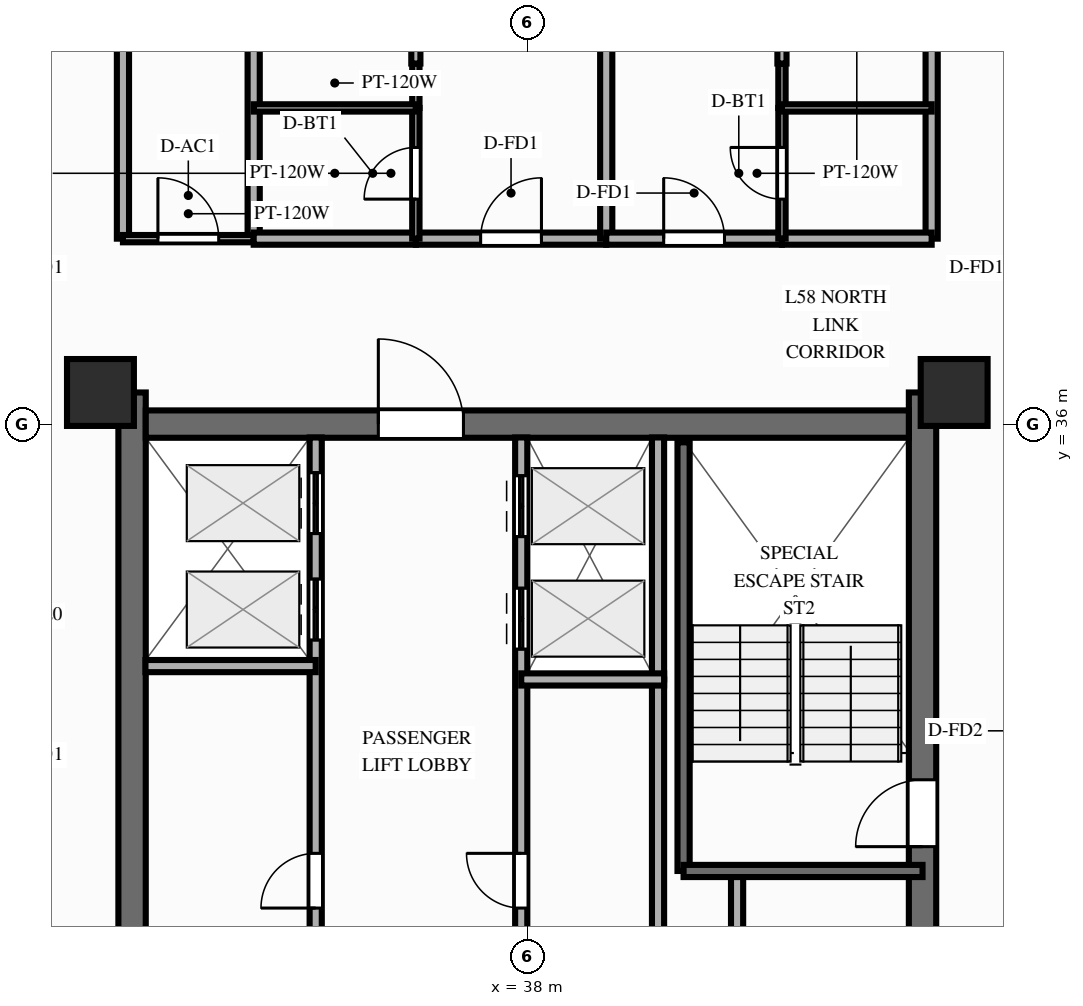
"""IFC4 building model, lengths in metres.
Left out: names, types, materials, properties, quantities, classifications, styles, units other than length and angle.
Written with IfcOpenShell. Run it as: python <this file> out.ifc"""

import sys

from ifc_helpers import new_model, si_unit, direction, frame, frame_2d, origin, origin_2d, place, context, subcontext, project, spatial, rectangle, extrude, source, transform, mapped, element, fill, save


model = new_model("IFC4")
c1 = context("Model", 3, precision=1e-05, world=origin(), true_north=direction((0.0, 1.0)))
c2 = subcontext(c1, "Body", "Model", "MODEL_VIEW")
j1 = project(units=[si_unit("LENGTHUNIT", "METRE"), si_unit("PLANEANGLEUNIT", "RADIAN")], contexts=[c1])
p1 = place(None, origin())
s1 = spatial("IfcSite", under=j1, at=p1, CompositionType="ELEMENT")
p2 = place(p1, origin())
s2 = spatial("IfcBuilding", under=s1, at=p2, CompositionType="ELEMENT")
p3 = place(p2, frame((0.0, 0.0, 186.7)))
s3 = spatial("IfcBuildingStorey", under=s2, at=p3, CompositionType="ELEMENT", Elevation=186.7)
p4 = place(p3, frame((31.5, 17.48, 0.0), z_axis=(0.0, 0.0, 1.0), x_axis=(0.0, 1.0, 0.0)))
e1 = element("IfcWall", 1, at=p4, inside=s3, PredefinedType="SHEAR", context=c2, shape_type="SweptSolid", body=[
    extrude(rectangle(XDim=19.04, YDim=0.45, at=frame_2d((9.52, 0.0))), origin(), (0.0, 0.0, 1.0), 3.0),
])
p5 = place(p4, frame((6.32, 0.0, 0.0)))
e2 = element("IfcOpeningElement", 2, at=p5, cuts=e1, PredefinedType="OPENING", context=c2, shape_type="SweptSolid", body=[
    extrude(rectangle(XDim=1.1, YDim=2.15, at=frame_2d((0.55, 1.075))), frame((0.0, 0.237, 0.0), z_axis=(0.0, -1.0, 0.0), x_axis=(1.0, 0.0, 0.0)), (0.0, 0.0, 1.0), 0.474),
])
p6 = place(p3, frame((44.5, 17.48, 0.0), z_axis=(0.0, 0.0, 1.0), x_axis=(0.0, 1.0, 0.0)))
e3 = element("IfcWall", 3, at=p6, inside=s3, PredefinedType="SHEAR", context=c2, shape_type="SweptSolid", body=[
    extrude(rectangle(XDim=19.04, YDim=0.45, at=frame_2d((9.52, 0.0))), origin(), (0.0, 0.0, 1.0), 3.0),
])
p7 = place(p6, frame((12.67, 0.0, 0.0), z_axis=(0.0, 0.0, 1.0), x_axis=(-1.0, 0.0, 0.0)))
e4 = element("IfcOpeningElement", 4, at=p7, cuts=e3, PredefinedType="OPENING", context=c2, shape_type="SweptSolid", body=[
    extrude(rectangle(XDim=1.1, YDim=2.15, at=frame_2d((0.55, 1.075))), frame((0.0, 0.237, 0.0), z_axis=(0.0, -1.0, 0.0), x_axis=(1.0, 0.0, 0.0)), (0.0, 0.0, 1.0), 0.474),
])
p8 = place(p3, frame((31.725, 36.0, 0.0), z_axis=(0.0, 0.0, 1.0), x_axis=(1.0, 0.0, 0.0)))
e5 = element("IfcWall", 5, at=p8, inside=s3, PredefinedType="SHEAR", context=c2, shape_type="SweptSolid", body=[
    extrude(rectangle(XDim=12.55, YDim=0.45, at=frame_2d((6.275, 0.0))), origin(), (0.0, 0.0, 1.0), 3.0),
])
p9 = place(p8, frame((5.225, 0.0, 0.0), z_axis=(0.0, 0.0, 1.0), x_axis=(-1.0, 0.0, 0.0)))
e6 = element("IfcOpeningElement", 6, at=p9, cuts=e5, PredefinedType="OPENING", context=c2, shape_type="SweptSolid", body=[
    extrude(rectangle(XDim=1.4, YDim=2.15, at=frame_2d((0.7, 1.075))), frame((0.0, 0.237, 0.0), z_axis=(0.0, -1.0, 0.0), x_axis=(1.0, 0.0, 0.0)), (0.0, 0.0, 1.0), 0.474),
])
m1 = source(origin(), c2, "Body", "SweptSolid", [
    extrude(rectangle(XDim=1.1, YDim=1.1, at=origin_2d()), origin(), (0.0, 0.0, 1.0), 3.0),
])
for number, where, z_axis, x_axis in (
    (7, (30.98, 36.52, 0.0), (0.0, 0.0, 1.0), (1.0, 0.0, 0.0)),
    (8, (45.02, 36.52, 0.0), (0.0, 0.0, 1.0), (1.0, 0.0, 0.0)),
):
    element("IfcColumn", number, at=place(p3, frame(where, z_axis=z_axis, x_axis=x_axis)), inside=s3, PredefinedType="COLUMN", context=c2, shape_type="MappedRepresentation", body=[
        mapped(m1, transform((0.0, 0.0, 0.0), scale=1.0)),
    ])
p10 = place(p3, frame((41.45, 21.18, 0.0), z_axis=(0.0, 0.0, 1.0), x_axis=(0.0, 1.0, 0.0)))
e9 = element("IfcWall", 9, at=p10, inside=s3, PredefinedType="PARTITIONING", context=c2, shape_type="SweptSolid", body=[
    extrude(rectangle(XDim=7.42, YDim=0.2, at=frame_2d((3.71, 0.0))), origin(), (0.0, 0.0, 1.0), 2.79),
])
p11 = place(p10, frame((2.6, 0.0, 0.0)))
e10 = element("IfcOpeningElement", 10, at=p11, cuts=e9, PredefinedType="OPENING", context=c2, shape_type="SweptSolid", body=[
    extrude(rectangle(XDim=0.9, YDim=2.1, at=frame_2d((0.45, 1.05))), frame((0.0, 0.112, 0.0), z_axis=(0.0, -1.0, 0.0), x_axis=(1.0, 0.0, 0.0)), (0.0, 0.0, 1.0), 0.224),
])
p12 = place(p3, frame((40.15, 25.44, 0.0), z_axis=(0.0, 0.0, 1.0), x_axis=(0.0, 1.0, 0.0)))
e11 = element("IfcWall", 11, at=p12, inside=s3, PredefinedType="PARTITIONING", context=c2, shape_type="SweptSolid", body=[
    extrude(rectangle(XDim=6.36, YDim=0.2, at=frame_2d((3.18, 0.0))), origin(), (0.0, 0.0, 1.0), 2.79),
])
p13 = place(p3, frame((40.15, 31.8, 0.0), z_axis=(0.0, 0.0, 1.0), x_axis=(0.0, 1.0, 0.0)))
e12 = element("IfcWall", 12, at=p13, inside=s3, PredefinedType="PARTITIONING", context=c2, shape_type="SweptSolid", body=[
    extrude(rectangle(XDim=3.98, YDim=0.2, at=frame_2d((1.99, 0.0))), origin(), (0.0, 0.0, 1.0), 2.79),
])
p14 = place(p3, frame((40.57, 28.65, 0.0), z_axis=(0.0, 0.0, 1.0), x_axis=(0.0, 1.0, 0.0)))
e13 = element("IfcWall", 13, at=p14, inside=s3, PredefinedType="SOLIDWALL", context=c2, shape_type="SweptSolid", body=[
    extrude(rectangle(XDim=7.05, YDim=0.2, at=frame_2d((3.525, 0.0))), origin(), (0.0, 0.0, 1.0), 2.79),
])
p15 = place(p3, frame((40.57, 28.65, 0.0), z_axis=(0.0, 0.0, 1.0), x_axis=(1.0, 0.0, 0.0)))
e14 = element("IfcWall", 14, at=p15, inside=s3, PredefinedType="SOLIDWALL", context=c2, shape_type="SweptSolid", body=[
    extrude(rectangle(XDim=3.93, YDim=0.2, at=frame_2d((1.965, 0.0))), origin(), (0.0, 0.0, 1.0), 2.79),
])
p16 = place(p3, frame((34.52, 25.44, 0.0), z_axis=(0.0, 0.0, 1.0), x_axis=(0.0, 1.0, 0.0)))
e15 = element("IfcWall", 15, at=p16, inside=s3, PredefinedType="PARTITIONING", context=c2, shape_type="SweptSolid", body=[
    extrude(rectangle(XDim=10.34, YDim=0.2, at=frame_2d((5.17, 0.0))), origin(), (0.0, 0.0, 1.0), 2.79),
])
p17 = place(p16, frame((2.6, 0.0, 0.0)))
e16 = element("IfcOpeningElement", 16, at=p17, cuts=e15, PredefinedType="OPENING", context=c2, shape_type="SweptSolid", body=[
    extrude(rectangle(XDim=0.9, YDim=2.1, at=frame_2d((0.45, 1.05))), frame((0.0, 0.112, 0.0), z_axis=(0.0, -1.0, 0.0), x_axis=(1.0, 0.0, 0.0)), (0.0, 0.0, 1.0), 0.224),
])
p18 = place(p16, frame((7.01, 0.0, 0.0)))
e17 = element("IfcOpeningElement", 17, at=p18, cuts=e15, PredefinedType="OPENING", context=c2, shape_type="SweptSolid", body=[
    extrude(rectangle(XDim=1.0, YDim=2.15, at=frame_2d((0.5, 1.075))), frame((0.0, 0.112, 0.0), z_axis=(0.0, -1.0, 0.0), x_axis=(1.0, 0.0, 0.0)), (0.0, 0.0, 1.0), 0.224),
])
p19 = place(p16, frame((8.76, 0.0, 0.0)))
e18 = element("IfcOpeningElement", 18, at=p19, cuts=e15, PredefinedType="OPENING", context=c2, shape_type="SweptSolid", body=[
    extrude(rectangle(XDim=1.0, YDim=2.15, at=frame_2d((0.5, 1.075))), frame((0.0, 0.112, 0.0), z_axis=(0.0, -1.0, 0.0), x_axis=(1.0, 0.0, 0.0)), (0.0, 0.0, 1.0), 0.224),
])
p20 = place(p3, frame((31.72, 32.02, 0.0), z_axis=(0.0, 0.0, 1.0), x_axis=(1.0, 0.0, 0.0)))
e19 = element("IfcWall", 19, at=p20, inside=s3, PredefinedType="PARTITIONING", context=c2, shape_type="SweptSolid", body=[
    extrude(rectangle(XDim=2.8, YDim=0.2, at=frame_2d((1.4, 0.0))), origin(), (0.0, 0.0, 1.0), 2.79),
])
p21 = place(p3, frame((37.9, 25.44, 0.0), z_axis=(0.0, 0.0, 1.0), x_axis=(0.0, 1.0, 0.0)))
e20 = element("IfcWall", 20, at=p21, inside=s3, PredefinedType="PARTITIONING", context=c2, shape_type="SweptSolid", body=[
    extrude(rectangle(XDim=10.34, YDim=0.2, at=frame_2d((5.17, 0.0))), origin(), (0.0, 0.0, 1.0), 2.79),
])
p22 = place(p21, frame((2.6, 0.0, 0.0)))
e21 = element("IfcOpeningElement", 21, at=p22, cuts=e20, PredefinedType="OPENING", context=c2, shape_type="SweptSolid", body=[
    extrude(rectangle(XDim=0.9, YDim=2.1, at=frame_2d((0.45, 1.05))), frame((0.0, 0.112, 0.0), z_axis=(0.0, -1.0, 0.0), x_axis=(1.0, 0.0, 0.0)), (0.0, 0.0, 1.0), 0.224),
])
p23 = place(p21, frame((6.86, 0.0, 0.0)))
e22 = element("IfcOpeningElement", 22, at=p23, cuts=e20, PredefinedType="OPENING", context=c2, shape_type="SweptSolid", body=[
    extrude(rectangle(XDim=1.0, YDim=2.15, at=frame_2d((0.5, 1.075))), frame((0.0, 0.112, 0.0), z_axis=(0.0, -1.0, 0.0), x_axis=(1.0, 0.0, 0.0)), (0.0, 0.0, 1.0), 0.224),
])
p24 = place(p21, frame((8.71, 0.0, 0.0)))
e23 = element("IfcOpeningElement", 23, at=p24, cuts=e20, PredefinedType="OPENING", context=c2, shape_type="SweptSolid", body=[
    extrude(rectangle(XDim=1.0, YDim=2.15, at=frame_2d((0.5, 1.075))), frame((0.0, 0.112, 0.0), z_axis=(0.0, -1.0, 0.0), x_axis=(1.0, 0.0, 0.0)), (0.0, 0.0, 1.0), 0.224),
])
p25 = place(p3, frame((37.9, 31.8, 0.0), z_axis=(0.0, 0.0, 1.0), x_axis=(1.0, 0.0, 0.0)))
e24 = element("IfcWall", 24, at=p25, inside=s3, PredefinedType="PARTITIONING", context=c2, shape_type="SweptSolid", body=[
    extrude(rectangle(XDim=2.35, YDim=0.2, at=frame_2d((1.175, 0.0))), origin(), (0.0, 0.0, 1.0), 2.79),
])
for number, where, z_axis, x_axis in (
    (25, (31.35, 39.05, 0.0), (0.0, 0.0, 1.0), (0.0, 1.0, 0.0)),
    (26, (44.65, 39.05, 0.0), (0.0, 0.0, 1.0), (0.0, 1.0, 0.0)),
):
    element("IfcWall", number, at=place(p3, frame(where, z_axis=z_axis, x_axis=x_axis)), inside=s3, PredefinedType="PARTITIONING", context=c2, shape_type="SweptSolid", body=[
        extrude(rectangle(XDim=8.8, YDim=0.2, at=frame_2d((4.4, 0.0))), origin(), (0.0, 0.0, 1.0), 2.39),
    ])
p26 = place(p3, frame((33.5, 39.05, 0.0), z_axis=(0.0, 0.0, 1.0), x_axis=(0.0, 1.0, 0.0)))
e27 = element("IfcWall", 27, at=p26, inside=s3, PredefinedType="PARTITIONING", context=c2, shape_type="SweptSolid", body=[
    extrude(rectangle(XDim=8.8, YDim=0.2, at=frame_2d((4.4, 0.0))), origin(), (0.0, 0.0, 1.0), 2.79),
])
p27 = place(p3, frame((31.35, 39.05, 0.0), z_axis=(0.0, 0.0, 1.0), x_axis=(1.0, 0.0, 0.0)))
e28 = element("IfcWall", 28, at=p27, inside=s3, PredefinedType="PARTITIONING", context=c2, shape_type="SweptSolid", body=[
    extrude(rectangle(XDim=2.15, YDim=0.12, at=frame_2d((1.075, 0.0))), origin(), (0.0, 0.0, 1.0), 2.79),
])
p28 = place(p27, frame((0.575, 0.0, 0.0)))
e29 = element("IfcOpeningElement", 29, at=p28, cuts=e28, PredefinedType="OPENING", context=c2, shape_type="SweptSolid", body=[
    extrude(rectangle(XDim=1.0, YDim=2.1, at=frame_2d((0.5, 1.05))), frame((0.0, 0.072, 0.0), z_axis=(0.0, -1.0, 0.0), x_axis=(1.0, 0.0, 0.0)), (0.0, 0.0, 1.0), 0.144),
])
p29 = place(p3, frame((33.5, 39.05, 0.0), z_axis=(0.0, 0.0, 1.0), x_axis=(1.0, 0.0, 0.0)))
e30 = element("IfcWall", 30, at=p29, inside=s3, PredefinedType="PARTITIONING", context=c2, shape_type="SweptSolid", body=[
    extrude(rectangle(XDim=2.667, YDim=0.2, at=frame_2d((1.333, 0.0))), origin(), (0.0, 0.0, 1.0), 2.79),
])
p30 = place(p3, frame((36.167, 39.05, 0.0), z_axis=(0.0, 0.0, 1.0), x_axis=(1.0, 0.0, 0.0)))
e31 = element("IfcWall", 31, at=p30, inside=s3, PredefinedType="PARTITIONING", context=c2, shape_type="SweptSolid", body=[
    extrude(rectangle(XDim=3.131, YDim=0.2, at=frame_2d((1.565, 0.0))), origin(), (0.0, 0.0, 1.0), 2.79),
])
p31 = place(p30, frame((1.065, 0.0, 0.0)))
e32 = element("IfcOpeningElement", 32, at=p31, cuts=e31, PredefinedType="OPENING", context=c2, shape_type="SweptSolid", body=[
    extrude(rectangle(XDim=1.0, YDim=2.15, at=frame_2d((0.5, 1.075))), frame((0.0, 0.112, 0.0), z_axis=(0.0, -1.0, 0.0), x_axis=(1.0, 0.0, 0.0)), (0.0, 0.0, 1.0), 0.224),
])
p32 = place(p3, frame((36.167, 39.05, 0.0), z_axis=(0.0, 0.0, 1.0), x_axis=(0.0, 1.0, 0.0)))
e33 = element("IfcWall", 33, at=p32, inside=s3, PredefinedType="PARTITIONING", context=c2, shape_type="SweptSolid", body=[
    extrude(rectangle(XDim=2.15, YDim=0.12, at=frame_2d((1.075, 0.0))), origin(), (0.0, 0.0, 1.0), 2.79),
])
p33 = place(p32, frame((0.65, 0.0, 0.0)))
e34 = element("IfcOpeningElement", 34, at=p33, cuts=e33, PredefinedType="OPENING", context=c2, shape_type="SweptSolid", body=[
    extrude(rectangle(XDim=0.85, YDim=2.05, at=frame_2d((0.425, 1.025))), frame((0.0, 0.072, 0.0), z_axis=(0.0, -1.0, 0.0), x_axis=(1.0, 0.0, 0.0)), (0.0, 0.0, 1.0), 0.144),
])
p34 = place(p3, frame((36.167, 41.2, 0.0), z_axis=(0.0, 0.0, 1.0), x_axis=(0.0, 1.0, 0.0)))
e35 = element("IfcWall", 35, at=p34, inside=s3, PredefinedType="PARTITIONING", context=c2, shape_type="SweptSolid", body=[
    extrude(rectangle(XDim=0.73, YDim=0.12, at=frame_2d((0.365, 0.0))), origin(), (0.0, 0.0, 1.0), 2.79),
])
p35 = place(p3, frame((33.5, 41.2, 0.0), z_axis=(0.0, 0.0, 1.0), x_axis=(1.0, 0.0, 0.0)))
e36 = element("IfcWall", 36, at=p35, inside=s3, PredefinedType="PARTITIONING", context=c2, shape_type="SweptSolid", body=[
    extrude(rectangle(XDim=2.667, YDim=0.12, at=frame_2d((1.333, 0.0))), origin(), (0.0, 0.0, 1.0), 2.79),
])
p36 = place(p3, frame((36.167, 41.93, 0.0), z_axis=(0.0, 0.0, 1.0), x_axis=(0.0, 1.0, 0.0)))
e37 = element("IfcWall", 37, at=p36, inside=s3, PredefinedType="PARTITIONING", context=c2, shape_type="SweptSolid", body=[
    extrude(rectangle(XDim=5.92, YDim=0.15, at=frame_2d((2.96, 0.0))), origin(), (0.0, 0.0, 1.0), 2.79),
])
p37 = place(p36, frame((2.321, 0.0, 0.0)))
e38 = element("IfcOpeningElement", 38, at=p37, cuts=e37, PredefinedType="OPENING", context=c2, shape_type="SweptSolid", body=[
    extrude(rectangle(XDim=0.9, YDim=2.1, at=frame_2d((0.45, 1.05))), frame((0.0, 0.087, 0.0), z_axis=(0.0, -1.0, 0.0), x_axis=(1.0, 0.0, 0.0)), (0.0, 0.0, 1.0), 0.174),
])
p38 = place(p3, frame((39.298, 39.05, 0.0), z_axis=(0.0, 0.0, 1.0), x_axis=(0.0, 1.0, 0.0)))
e39 = element("IfcWall", 39, at=p38, inside=s3, PredefinedType="PARTITIONING", context=c2, shape_type="SweptSolid", body=[
    extrude(rectangle(XDim=8.8, YDim=0.2, at=frame_2d((4.4, 0.0))), origin(), (0.0, 0.0, 1.0), 2.79),
])
p39 = place(p3, frame((39.298, 39.05, 0.0), z_axis=(0.0, 0.0, 1.0), x_axis=(1.0, 0.0, 0.0)))
e40 = element("IfcWall", 40, at=p39, inside=s3, PredefinedType="PARTITIONING", context=c2, shape_type="SweptSolid", body=[
    extrude(rectangle(XDim=2.89, YDim=0.2, at=frame_2d((1.445, 0.0))), origin(), (0.0, 0.0, 1.0), 2.79),
])
p40 = place(p39, frame((0.945, 0.0, 0.0)))
e41 = element("IfcOpeningElement", 41, at=p40, cuts=e40, PredefinedType="OPENING", context=c2, shape_type="SweptSolid", body=[
    extrude(rectangle(XDim=1.0, YDim=2.15, at=frame_2d((0.5, 1.075))), frame((0.0, 0.112, 0.0), z_axis=(0.0, -1.0, 0.0), x_axis=(1.0, 0.0, 0.0)), (0.0, 0.0, 1.0), 0.224),
])
p41 = place(p3, frame((42.188, 39.05, 0.0), z_axis=(0.0, 0.0, 1.0), x_axis=(1.0, 0.0, 0.0)))
e42 = element("IfcWall", 42, at=p41, inside=s3, PredefinedType="PARTITIONING", context=c2, shape_type="SweptSolid", body=[
    extrude(rectangle(XDim=2.462, YDim=0.2, at=frame_2d((1.231, 0.0))), origin(), (0.0, 0.0, 1.0), 2.79),
])
p42 = place(p3, frame((42.188, 39.05, 0.0), z_axis=(0.0, 0.0, 1.0), x_axis=(0.0, 1.0, 0.0)))
e43 = element("IfcWall", 43, at=p42, inside=s3, PredefinedType="PARTITIONING", context=c2, shape_type="SweptSolid", body=[
    extrude(rectangle(XDim=2.15, YDim=0.12, at=frame_2d((1.075, 0.0))), origin(), (0.0, 0.0, 1.0), 2.79),
])
p43 = place(p42, frame((0.65, 0.0, 0.0)))
e44 = element("IfcOpeningElement", 44, at=p43, cuts=e43, PredefinedType="OPENING", context=c2, shape_type="SweptSolid", body=[
    extrude(rectangle(XDim=0.85, YDim=2.05, at=frame_2d((0.425, 1.025))), frame((0.0, 0.072, 0.0), z_axis=(0.0, -1.0, 0.0), x_axis=(1.0, 0.0, 0.0)), (0.0, 0.0, 1.0), 0.144),
])
p44 = place(p3, frame((42.188, 41.2, 0.0), z_axis=(0.0, 0.0, 1.0), x_axis=(0.0, 1.0, 0.0)))
e45 = element("IfcWall", 45, at=p44, inside=s3, PredefinedType="PARTITIONING", context=c2, shape_type="SweptSolid", body=[
    extrude(rectangle(XDim=0.73, YDim=0.12, at=frame_2d((0.365, 0.0))), origin(), (0.0, 0.0, 1.0), 2.79),
])
p45 = place(p3, frame((42.188, 41.2, 0.0), z_axis=(0.0, 0.0, 1.0), x_axis=(1.0, 0.0, 0.0)))
e46 = element("IfcWall", 46, at=p45, inside=s3, PredefinedType="PARTITIONING", context=c2, shape_type="SweptSolid", body=[
    extrude(rectangle(XDim=2.462, YDim=0.12, at=frame_2d((1.231, 0.0))), origin(), (0.0, 0.0, 1.0), 2.79),
])
p46 = place(p3, frame((42.188, 41.93, 0.0), z_axis=(0.0, 0.0, 1.0), x_axis=(0.0, 1.0, 0.0)))
e47 = element("IfcWall", 47, at=p46, inside=s3, PredefinedType="PARTITIONING", context=c2, shape_type="SweptSolid", body=[
    extrude(rectangle(XDim=5.92, YDim=0.15, at=frame_2d((2.96, 0.0))), origin(), (0.0, 0.0, 1.0), 2.79),
])
p47 = place(p46, frame((2.321, 0.0, 0.0)))
e48 = element("IfcOpeningElement", 48, at=p47, cuts=e47, PredefinedType="OPENING", context=c2, shape_type="SweptSolid", body=[
    extrude(rectangle(XDim=0.9, YDim=2.1, at=frame_2d((0.45, 1.05))), frame((0.0, 0.087, 0.0), z_axis=(0.0, -1.0, 0.0), x_axis=(1.0, 0.0, 0.0)), (0.0, 0.0, 1.0), 0.174),
])
m2 = source(origin(), c2, "Body", "SweptSolid", [
    extrude(rectangle(XDim=1.1, YDim=2.15, at=frame_2d((0.55, 1.075))), frame((0.0, 0.025, 0.0), z_axis=(0.0, -1.0, 0.0), x_axis=(1.0, 0.0, 0.0)), (0.0, 0.0, 1.0), 0.05),
])
p48 = place(p7, origin())
e49 = element("IfcDoor", 49, at=p48, inside=s3, OperationType="SINGLE_SWING_RIGHT", PredefinedType="DOOR", context=c2, shape_type="MappedRepresentation", body=[
    mapped(m2, transform((0.0, 0.0, 0.0), scale=1.0)),
])
fill(e4, e49)
m3 = source(origin(), c2, "Body", "SweptSolid", [
    extrude(rectangle(XDim=1.4, YDim=2.15, at=frame_2d((0.7, 1.075))), frame((0.0, 0.025, 0.0), z_axis=(0.0, -1.0, 0.0), x_axis=(1.0, 0.0, 0.0)), (0.0, 0.0, 1.0), 0.05),
])
p49 = place(p9, origin())
e50 = element("IfcDoor", 50, at=p49, inside=s3, OperationType="SINGLE_SWING_RIGHT", PredefinedType="DOOR", context=c2, shape_type="MappedRepresentation", body=[
    mapped(m3, transform((0.0, 0.0, 0.0), scale=1.0)),
])
fill(e6, e50)
m4 = source(origin(), c2, "Body", "SweptSolid", [
    extrude(rectangle(XDim=0.9, YDim=2.1, at=frame_2d((0.45, 1.05))), frame((0.0, 0.025, 0.0), z_axis=(0.0, -1.0, 0.0), x_axis=(1.0, 0.0, 0.0)), (0.0, 0.0, 1.0), 0.05),
])
p50 = place(p17, origin())
e51 = element("IfcDoor", 51, at=p50, inside=s3, OperationType="SINGLE_SWING_LEFT", PredefinedType="DOOR", context=c2, shape_type="MappedRepresentation", body=[
    mapped(m4, transform((0.0, 0.0, 0.0), scale=1.0)),
])
fill(e16, e51)
m5 = source(origin(), c2, "Body", "SweptSolid", [
    extrude(rectangle(XDim=1.0, YDim=2.15, at=frame_2d((0.5, 1.075))), frame((0.0, 0.025, 0.0), z_axis=(0.0, -1.0, 0.0), x_axis=(1.0, 0.0, 0.0)), (0.0, 0.0, 1.0), 0.05),
])
p51 = place(p18, origin())
e52 = element("IfcDoor", 52, at=p51, inside=s3, OperationType="DOUBLE_DOOR_SLIDING", PredefinedType="DOOR", context=c2, shape_type="MappedRepresentation", body=[
    mapped(m5, transform((0.0, 0.0, 0.0), scale=1.0)),
])
fill(e17, e52)
p52 = place(p19, origin())
e53 = element("IfcDoor", 53, at=p52, inside=s3, OperationType="DOUBLE_DOOR_SLIDING", PredefinedType="DOOR", context=c2, shape_type="MappedRepresentation", body=[
    mapped(m5, transform((0.0, 0.0, 0.0), scale=1.0)),
])
fill(e18, e53)
p53 = place(p22, origin())
e54 = element("IfcDoor", 54, at=p53, inside=s3, OperationType="SINGLE_SWING_RIGHT", PredefinedType="DOOR", context=c2, shape_type="MappedRepresentation", body=[
    mapped(m4, transform((0.0, 0.0, 0.0), scale=1.0)),
])
fill(e21, e54)
p54 = place(p23, origin())
e55 = element("IfcDoor", 55, at=p54, inside=s3, OperationType="DOUBLE_DOOR_SLIDING", PredefinedType="DOOR", context=c2, shape_type="MappedRepresentation", body=[
    mapped(m5, transform((0.0, 0.0, 0.0), scale=1.0)),
])
fill(e22, e55)
p55 = place(p24, origin())
e56 = element("IfcDoor", 56, at=p55, inside=s3, OperationType="DOUBLE_DOOR_SLIDING", PredefinedType="DOOR", context=c2, shape_type="MappedRepresentation", body=[
    mapped(m5, transform((0.0, 0.0, 0.0), scale=1.0)),
])
fill(e23, e56)
m6 = source(origin(), c2, "Body", "SweptSolid", [
    extrude(rectangle(XDim=1.0, YDim=2.1, at=frame_2d((0.5, 1.05))), frame((0.0, 0.025, 0.0), z_axis=(0.0, -1.0, 0.0), x_axis=(1.0, 0.0, 0.0)), (0.0, 0.0, 1.0), 0.05),
])
p56 = place(p28, origin())
e57 = element("IfcDoor", 57, at=p56, inside=s3, OperationType="SINGLE_SWING_LEFT", PredefinedType="DOOR", context=c2, shape_type="MappedRepresentation", body=[
    mapped(m6, transform((0.0, 0.0, 0.0), scale=1.0)),
])
fill(e29, e57)
p57 = place(p31, origin())
e58 = element("IfcDoor", 58, at=p57, inside=s3, OperationType="SINGLE_SWING_RIGHT", PredefinedType="DOOR", context=c2, shape_type="MappedRepresentation", body=[
    mapped(m5, transform((0.0, 0.0, 0.0), scale=1.0)),
])
fill(e32, e58)
m7 = source(origin(), c2, "Body", "SweptSolid", [
    extrude(rectangle(XDim=0.85, YDim=2.05, at=frame_2d((0.425, 1.025))), frame((0.0, 0.025, 0.0), z_axis=(0.0, -1.0, 0.0), x_axis=(1.0, 0.0, 0.0)), (0.0, 0.0, 1.0), 0.05),
])
p58 = place(p33, origin())
e59 = element("IfcDoor", 59, at=p58, inside=s3, OperationType="SINGLE_SWING_LEFT", PredefinedType="DOOR", context=c2, shape_type="MappedRepresentation", body=[
    mapped(m7, transform((0.0, 0.0, 0.0), scale=1.0)),
])
fill(e34, e59)
p59 = place(p40, origin())
e60 = element("IfcDoor", 60, at=p59, inside=s3, OperationType="SINGLE_SWING_LEFT", PredefinedType="DOOR", context=c2, shape_type="MappedRepresentation", body=[
    mapped(m5, transform((0.0, 0.0, 0.0), scale=1.0)),
])
fill(e41, e60)
p60 = place(p43, origin())
e61 = element("IfcDoor", 61, at=p60, inside=s3, OperationType="SINGLE_SWING_RIGHT", PredefinedType="DOOR", context=c2, shape_type="MappedRepresentation", body=[
    mapped(m7, transform((0.0, 0.0, 0.0), scale=1.0)),
])
fill(e44, e61)
save(model, sys.argv[1])
